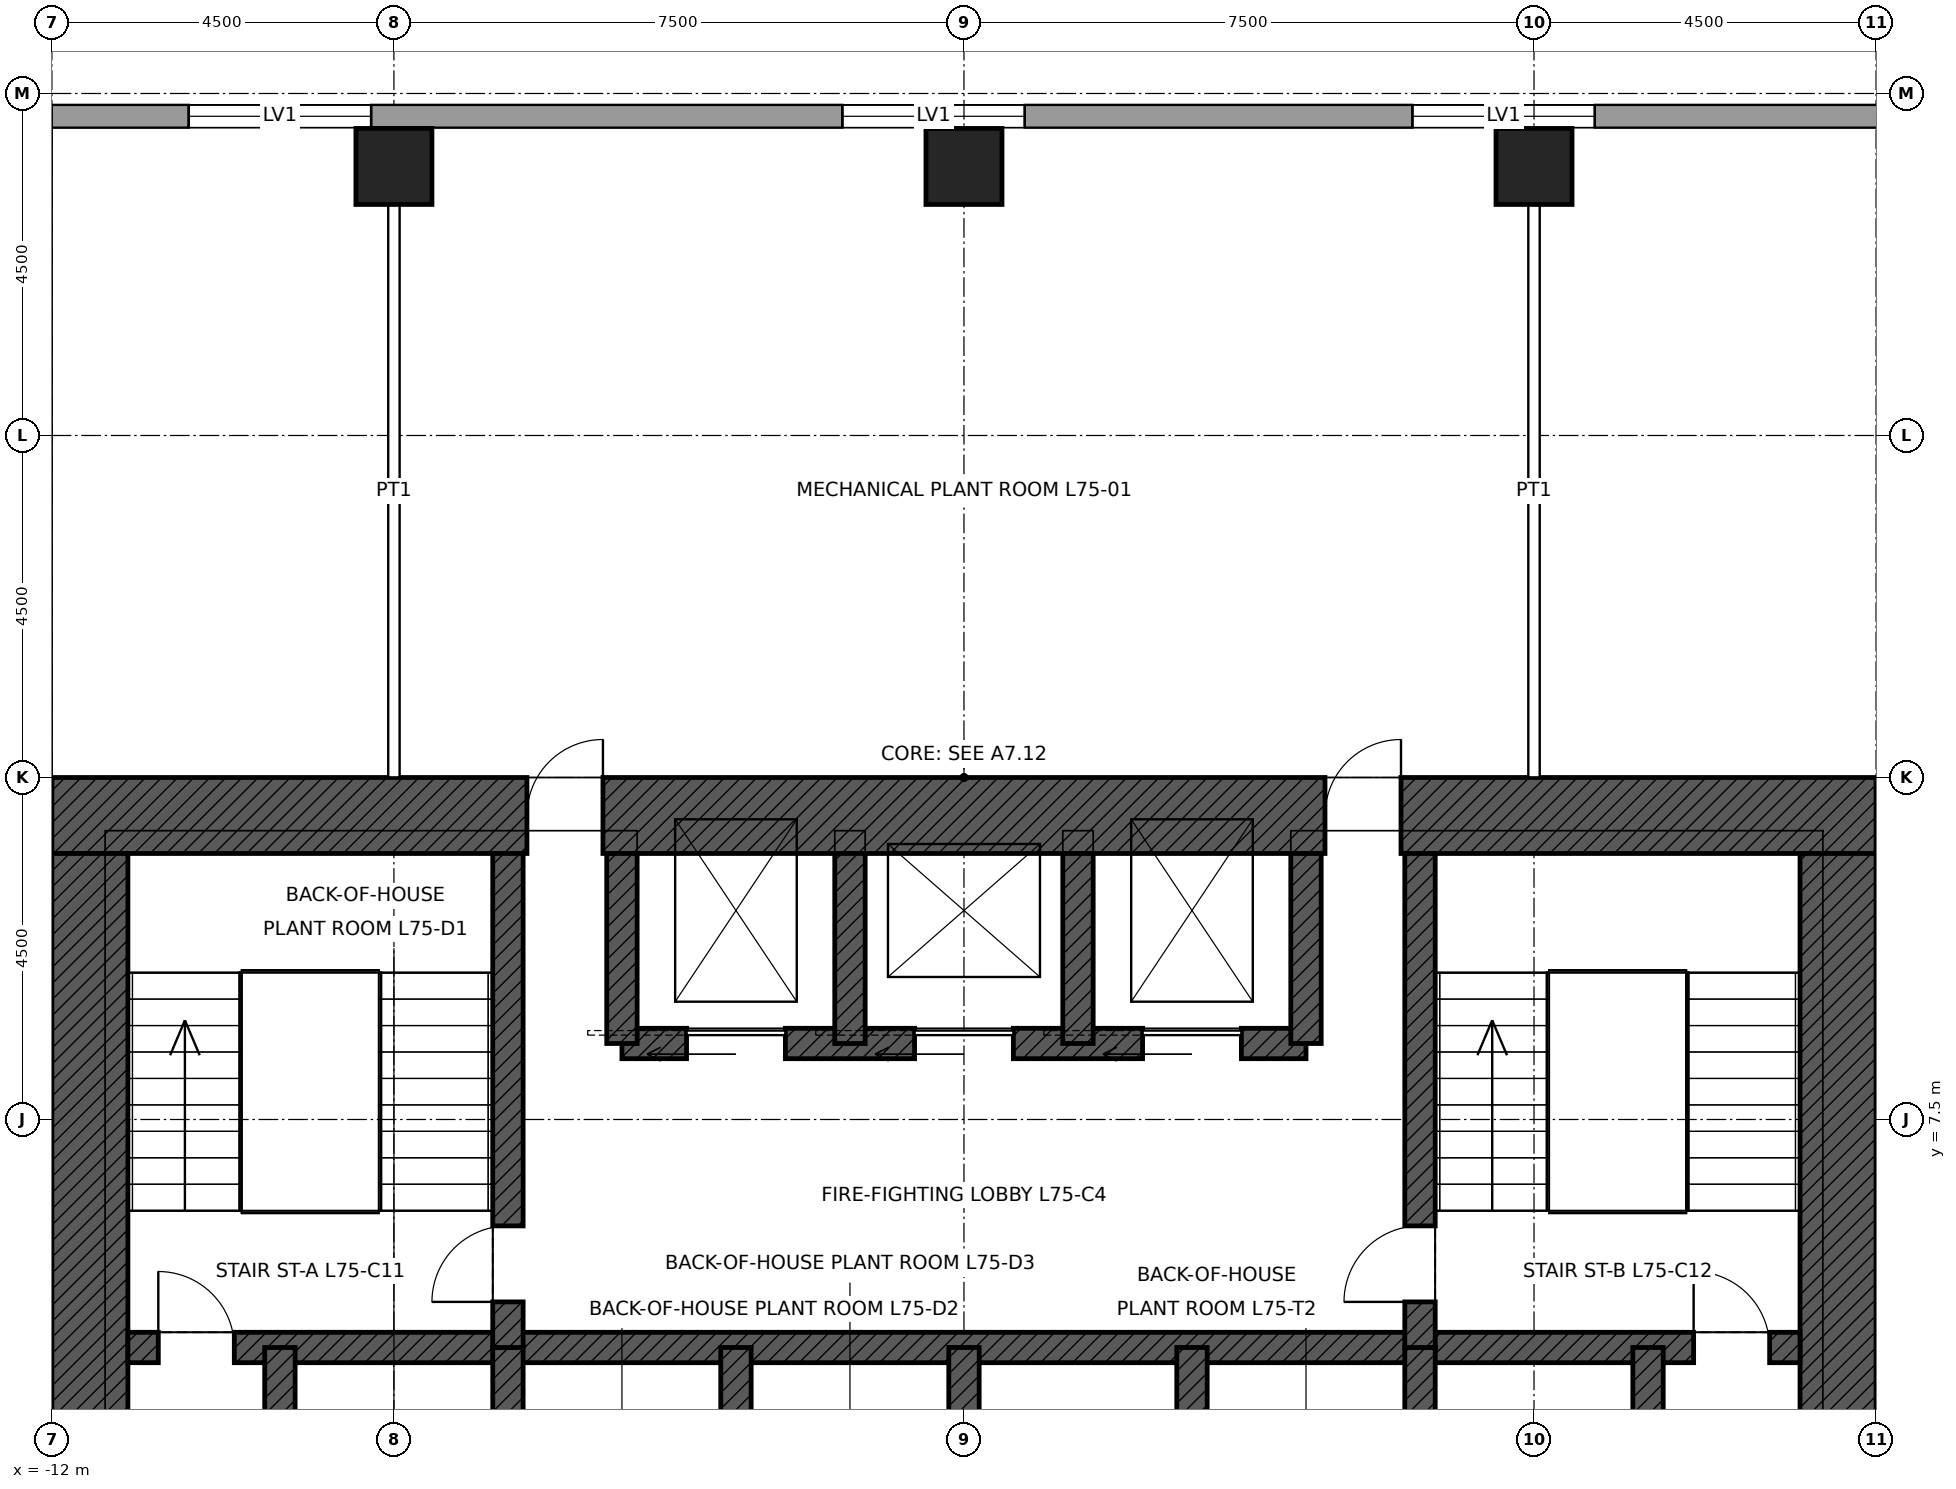
"""IFC4 building model, lengths in metres.
Left out: names, types, materials, properties, quantities, classifications, styles, units other than length and angle.
Written with IfcOpenShell. Run it as: python <this file> out.ifc"""

import sys

from ifc_helpers import new_model, si_unit, direction, frame, frame_2d, origin, origin_2d, place, context, subcontext, project, spatial, rectangle, hollow_rectangle, extrude, element, fill, save


model = new_model("IFC4")
c1 = context("Model", 3, precision=1e-05, world=origin(), true_north=direction((0.0, 1.0)))
c2 = subcontext(c1, "Body", "Model", "MODEL_VIEW")
j1 = project(units=[si_unit("LENGTHUNIT", "METRE"), si_unit("PLANEANGLEUNIT", "RADIAN")], contexts=[c1])
p1 = place(None, origin())
s1 = spatial("IfcSite", under=j1, at=p1, CompositionType="ELEMENT")
p2 = place(p1, origin())
s2 = spatial("IfcBuilding", under=s1, at=p2, CompositionType="ELEMENT")
p3 = place(p2, frame((0.0, 0.0, 335.9)))
s3 = spatial("IfcBuildingStorey", under=s2, at=p3, CompositionType="ELEMENT", Elevation=335.9)
for number, where, z_axis, x_axis in (
    (1, (-7.5, 20.04, 0.0), (0.0, 0.0, 1.0), (1.0, 0.0, 0.0)),
    (2, (0.0, 20.04, 0.0), (0.0, 0.0, 1.0), (1.0, 0.0, 0.0)),
    (3, (7.5, 20.04, 0.0), (0.0, 0.0, 1.0), (1.0, 0.0, 0.0)),
):
    element("IfcColumn", number, at=place(p3, frame(where, z_axis=z_axis, x_axis=x_axis)), inside=s3, PredefinedType="COLUMN", context=c2, shape_type="SweptSolid", body=[
        extrude(hollow_rectangle(XDim=1.0, YDim=1.0, WallThickness=0.075, at=origin_2d()), origin(), (0.0, 0.0, 1.0), 6.0),
    ])
p4 = place(p3, frame((-12.0, 11.5, 0.0), z_axis=(0.0, 0.0, 1.0), x_axis=(1.0, 0.0, 0.0)))
e4 = element("IfcWall", 4, at=p4, inside=s3, PredefinedType="SHEAR", context=c2, shape_type="SweptSolid", body=[
    extrude(rectangle(XDim=24.0, YDim=1.0, at=frame_2d((12.0, 0.0))), origin(), (0.0, 0.0, 1.0), 6.0),
])
p5 = place(p4, frame((6.25, 0.0, 0.0)))
e5 = element("IfcOpeningElement", 5, at=p5, cuts=e4, PredefinedType="OPENING", context=c2, shape_type="SweptSolid", body=[
    extrude(rectangle(XDim=1.0, YDim=2.4, at=frame_2d((0.5, 1.2))), frame((0.0, 0.51, 0.0), z_axis=(0.0, -1.0, 0.0), x_axis=(1.0, 0.0, 0.0)), (0.0, 0.0, 1.0), 1.02),
])
p6 = place(p4, frame((16.75, 0.0, 0.0)))
e6 = element("IfcOpeningElement", 6, at=p6, cuts=e4, PredefinedType="OPENING", context=c2, shape_type="SweptSolid", body=[
    extrude(rectangle(XDim=1.0, YDim=2.4, at=frame_2d((0.5, 1.2))), frame((0.0, 0.51, 0.0), z_axis=(0.0, -1.0, 0.0), x_axis=(1.0, 0.0, 0.0)), (0.0, 0.0, 1.0), 1.02),
])
p7 = place(p3, frame((11.5, 11.0, 0.0), z_axis=(0.0, 0.0, 1.0), x_axis=(0.0, -1.0, 0.0)))
e7 = element("IfcWall", 7, at=p7, inside=s3, PredefinedType="SHEAR", context=c2, shape_type="SweptSolid", body=[
    extrude(rectangle(XDim=22.0, YDim=1.0, at=frame_2d((11.0, 0.0))), origin(), (0.0, 0.0, 1.0), 6.0),
])
p8 = place(p7, frame((10.5, 0.0, 0.0)))
e8 = element("IfcOpeningElement", 8, at=p8, cuts=e7, PredefinedType="OPENING", context=c2, shape_type="SweptSolid", body=[
    extrude(rectangle(XDim=1.0, YDim=2.4, at=frame_2d((0.5, 1.2))), frame((0.0, 0.51, 0.0), z_axis=(0.0, -1.0, 0.0), x_axis=(1.0, 0.0, 0.0)), (0.0, 0.0, 1.0), 1.02),
])
p9 = place(p3, frame((-11.5, -11.0, 0.0), z_axis=(0.0, 0.0, 1.0), x_axis=(0.0, 1.0, 0.0)))
e9 = element("IfcWall", 9, at=p9, inside=s3, PredefinedType="SHEAR", context=c2, shape_type="SweptSolid", body=[
    extrude(rectangle(XDim=22.0, YDim=1.0, at=frame_2d((11.0, 0.0))), origin(), (0.0, 0.0, 1.0), 6.0),
])
p10 = place(p9, frame((10.5, 0.0, 0.0)))
e10 = element("IfcOpeningElement", 10, at=p10, cuts=e9, PredefinedType="OPENING", context=c2, shape_type="SweptSolid", body=[
    extrude(rectangle(XDim=1.0, YDim=2.4, at=frame_2d((0.5, 1.2))), frame((0.0, 0.51, 0.0), z_axis=(0.0, -1.0, 0.0), x_axis=(1.0, 0.0, 0.0)), (0.0, 0.0, 1.0), 1.02),
])
p11 = place(p3, frame((-11.0, 4.5, 0.0), z_axis=(0.0, 0.0, 1.0), x_axis=(1.0, 0.0, 0.0)))
e11 = element("IfcWall", 11, at=p11, inside=s3, PredefinedType="SHEAR", context=c2, shape_type="SweptSolid", body=[
    extrude(rectangle(XDim=22.0, YDim=0.4, at=frame_2d((11.0, 0.0))), origin(), (0.0, 0.0, 1.0), 6.0),
])
p12 = place(p11, frame((0.4, 0.0, 0.0)))
e12 = element("IfcOpeningElement", 12, at=p12, cuts=e11, PredefinedType="OPENING", context=c2, shape_type="SweptSolid", body=[
    extrude(rectangle(XDim=1.0, YDim=2.1, at=frame_2d((0.5, 1.05))), frame((0.0, 0.21, 0.0), z_axis=(0.0, -1.0, 0.0), x_axis=(1.0, 0.0, 0.0)), (0.0, 0.0, 1.0), 0.42),
])
p13 = place(p11, frame((20.6, 0.0, 0.0)))
e13 = element("IfcOpeningElement", 13, at=p13, cuts=e11, PredefinedType="OPENING", context=c2, shape_type="SweptSolid", body=[
    extrude(rectangle(XDim=1.0, YDim=2.1, at=frame_2d((0.5, 1.05))), frame((0.0, 0.21, 0.0), z_axis=(0.0, -1.0, 0.0), x_axis=(1.0, 0.0, 0.0)), (0.0, 0.0, 1.0), 0.42),
])
p14 = place(p3, frame((-4.5, 8.5, 0.0), z_axis=(0.0, 0.0, 1.0), x_axis=(1.0, 0.0, 0.0)))
e14 = element("IfcWall", 14, at=p14, inside=s3, PredefinedType="SHEAR", context=c2, shape_type="SweptSolid", body=[
    extrude(rectangle(XDim=9.0, YDim=0.4, at=frame_2d((4.5, 0.0))), origin(), (0.0, 0.0, 1.0), 6.0),
])
p15 = place(p14, frame((0.85, 0.0, 0.0)))
e15 = element("IfcOpeningElement", 15, at=p15, cuts=e14, PredefinedType="OPENING", context=c2, shape_type="SweptSolid", body=[
    extrude(rectangle(XDim=1.3, YDim=2.4, at=frame_2d((0.65, 1.2))), frame((0.0, 0.21, 0.0), z_axis=(0.0, -1.0, 0.0), x_axis=(1.0, 0.0, 0.0)), (0.0, 0.0, 1.0), 0.42),
])
p16 = place(p14, frame((6.85, 0.0, 0.0)))
e16 = element("IfcOpeningElement", 16, at=p16, cuts=e14, PredefinedType="OPENING", context=c2, shape_type="SweptSolid", body=[
    extrude(rectangle(XDim=1.3, YDim=2.4, at=frame_2d((0.65, 1.2))), frame((0.0, 0.21, 0.0), z_axis=(0.0, -1.0, 0.0), x_axis=(1.0, 0.0, 0.0)), (0.0, 0.0, 1.0), 0.42),
])
p17 = place(p14, frame((3.85, 0.0, 0.0)))
e17 = element("IfcOpeningElement", 17, at=p17, cuts=e14, PredefinedType="OPENING", context=c2, shape_type="SweptSolid", body=[
    extrude(rectangle(XDim=1.3, YDim=2.4, at=frame_2d((0.65, 1.2))), frame((0.0, 0.21, 0.0), z_axis=(0.0, -1.0, 0.0), x_axis=(1.0, 0.0, 0.0)), (0.0, 0.0, 1.0), 0.42),
])
for number, where, z_axis, x_axis in (
    (18, (-9.0, 1.5, 0.0), (0.0, 0.0, 1.0), (0.0, 1.0, 0.0)),
    (19, (9.0, 1.5, 0.0), (0.0, 0.0, 1.0), (0.0, 1.0, 0.0)),
    (20, (-6.0, 1.5, 0.0), (0.0, 0.0, 1.0), (0.0, 1.0, 0.0)),
    (21, (-3.0, 1.5, 0.0), (0.0, 0.0, 1.0), (0.0, 1.0, 0.0)),
    (22, (0.0, 1.5, 0.0), (0.0, 0.0, 1.0), (0.0, 1.0, 0.0)),
    (23, (3.0, 1.5, 0.0), (0.0, 0.0, 1.0), (0.0, 1.0, 0.0)),
    (24, (6.0, 1.5, 0.0), (0.0, 0.0, 1.0), (0.0, 1.0, 0.0)),
):
    element("IfcWall", number, at=place(p3, frame(where, z_axis=z_axis, x_axis=x_axis)), inside=s3, PredefinedType="SHEAR", context=c2, shape_type="SweptSolid", body=[
        extrude(rectangle(XDim=3.0, YDim=0.4, at=frame_2d((1.5, 0.0))), origin(), (0.0, 0.0, 1.0), 6.0),
    ])
p18 = place(p3, frame((-6.0, 4.5, 0.0), z_axis=(0.0, 0.0, 1.0), x_axis=(0.0, 1.0, 0.0)))
e25 = element("IfcWall", 25, at=p18, inside=s3, PredefinedType="SHEAR", context=c2, shape_type="SweptSolid", body=[
    extrude(rectangle(XDim=6.5, YDim=0.4, at=frame_2d((3.25, 0.0))), origin(), (0.0, 0.0, 1.0), 6.0),
])
p19 = place(p18, frame((0.6, 0.0, 0.0)))
e26 = element("IfcOpeningElement", 26, at=p19, cuts=e25, PredefinedType="OPENING", context=c2, shape_type="SweptSolid", body=[
    extrude(rectangle(XDim=1.0, YDim=2.1, at=frame_2d((0.5, 1.05))), frame((0.0, 0.21, 0.0), z_axis=(0.0, -1.0, 0.0), x_axis=(1.0, 0.0, 0.0)), (0.0, 0.0, 1.0), 0.42),
])
p20 = place(p3, frame((6.0, 4.5, 0.0), z_axis=(0.0, 0.0, 1.0), x_axis=(0.0, 1.0, 0.0)))
e27 = element("IfcWall", 27, at=p20, inside=s3, PredefinedType="SHEAR", context=c2, shape_type="SweptSolid", body=[
    extrude(rectangle(XDim=6.5, YDim=0.4, at=frame_2d((3.25, 0.0))), origin(), (0.0, 0.0, 1.0), 6.0),
])
p21 = place(p20, frame((0.6, 0.0, 0.0)))
e28 = element("IfcOpeningElement", 28, at=p21, cuts=e27, PredefinedType="OPENING", context=c2, shape_type="SweptSolid", body=[
    extrude(rectangle(XDim=1.0, YDim=2.1, at=frame_2d((0.5, 1.05))), frame((0.0, 0.21, 0.0), z_axis=(0.0, -1.0, 0.0), x_axis=(1.0, 0.0, 0.0)), (0.0, 0.0, 1.0), 0.42),
])
for number, where, z_axis, x_axis in (
    (29, (-4.5, 8.5, 0.0), (0.0, 0.0, 1.0), (0.0, 1.0, 0.0)),
    (30, (4.5, 8.5, 0.0), (0.0, 0.0, 1.0), (0.0, 1.0, 0.0)),
    (31, (-1.5, 8.5, 0.0), (0.0, 0.0, 1.0), (0.0, 1.0, 0.0)),
    (32, (1.5, 8.5, 0.0), (0.0, 0.0, 1.0), (0.0, 1.0, 0.0)),
):
    element("IfcWall", number, at=place(p3, frame(where, z_axis=z_axis, x_axis=x_axis)), inside=s3, PredefinedType="SHEAR", context=c2, shape_type="SweptSolid", body=[
        extrude(rectangle(XDim=2.5, YDim=0.4, at=frame_2d((1.25, 0.0))), origin(), (0.0, 0.0, 1.0), 6.0),
    ])
p22 = place(p3, frame((-13.2, 20.7, 0.0), z_axis=(0.0, 0.0, 1.0), x_axis=(1.0, 0.0, 0.0)))
e33 = element("IfcWall", 33, at=p22, inside=s3, PredefinedType="SOLIDWALL", context=c2, shape_type="SweptSolid", body=[
    extrude(rectangle(XDim=26.4, YDim=0.3, at=frame_2d((13.2, 0.0))), origin(), (0.0, 0.0, 1.0), 5.8),
])
p23 = place(p22, frame((3.0, 0.0, 0.6)))
e34 = element("IfcOpeningElement", 34, at=p23, cuts=e33, PredefinedType="OPENING", context=c2, shape_type="SweptSolid", body=[
    extrude(rectangle(XDim=2.4, YDim=2.4, at=frame_2d((1.2, 1.2))), frame((0.0, 0.16, 0.0), z_axis=(0.0, -1.0, 0.0), x_axis=(1.0, 0.0, 0.0)), (0.0, 0.0, 1.0), 0.32),
])
p24 = place(p22, frame((11.6, 0.0, 0.6)))
e35 = element("IfcOpeningElement", 35, at=p24, cuts=e33, PredefinedType="OPENING", context=c2, shape_type="SweptSolid", body=[
    extrude(rectangle(XDim=2.4, YDim=2.4, at=frame_2d((1.2, 1.2))), frame((0.0, 0.16, 0.0), z_axis=(0.0, -1.0, 0.0), x_axis=(1.0, 0.0, 0.0)), (0.0, 0.0, 1.0), 0.32),
])
p25 = place(p22, frame((19.1, 0.0, 0.6)))
e36 = element("IfcOpeningElement", 36, at=p25, cuts=e33, PredefinedType="OPENING", context=c2, shape_type="SweptSolid", body=[
    extrude(rectangle(XDim=2.4, YDim=2.4, at=frame_2d((1.2, 1.2))), frame((0.0, 0.16, 0.0), z_axis=(0.0, -1.0, 0.0), x_axis=(1.0, 0.0, 0.0)), (0.0, 0.0, 1.0), 0.32),
])
for number, where, z_axis, x_axis in (
    (37, (-7.5, 12.0, 0.0), (0.0, 0.0, 1.0), (0.0, 1.0, 0.0)),
    (38, (7.5, 12.0, 0.0), (0.0, 0.0, 1.0), (0.0, 1.0, 0.0)),
):
    element("IfcWall", number, at=place(p3, frame(where, z_axis=z_axis, x_axis=x_axis)), inside=s3, PredefinedType="PARTITIONING", context=c2, shape_type="SweptSolid", body=[
        extrude(rectangle(XDim=7.54, YDim=0.15, at=frame_2d((3.77, 0.0))), origin(), (0.0, 0.0, 1.0), 4.998),
    ])
p26 = place(p23, origin())
e39 = element("IfcWindow", 39, at=p26, inside=s3, PartitioningType="SINGLE_PANEL", PredefinedType="WINDOW", context=c2, shape_type="SweptSolid", body=[
    extrude(rectangle(XDim=2.4, YDim=2.4, at=frame_2d((1.2, 1.2))), frame((0.0, 0.15, 0.0), z_axis=(0.0, -1.0, 0.0), x_axis=(1.0, 0.0, 0.0)), (0.0, 0.0, 1.0), 0.06),
])
fill(e34, e39)
p27 = place(p24, origin())
e40 = element("IfcWindow", 40, at=p27, inside=s3, PartitioningType="SINGLE_PANEL", PredefinedType="WINDOW", context=c2, shape_type="SweptSolid", body=[
    extrude(rectangle(XDim=2.4, YDim=2.4, at=frame_2d((1.2, 1.2))), frame((0.0, 0.15, 0.0), z_axis=(0.0, -1.0, 0.0), x_axis=(1.0, 0.0, 0.0)), (0.0, 0.0, 1.0), 0.06),
])
fill(e35, e40)
p28 = place(p25, origin())
e41 = element("IfcWindow", 41, at=p28, inside=s3, PartitioningType="SINGLE_PANEL", PredefinedType="WINDOW", context=c2, shape_type="SweptSolid", body=[
    extrude(rectangle(XDim=2.4, YDim=2.4, at=frame_2d((1.2, 1.2))), frame((0.0, 0.15, 0.0), z_axis=(0.0, -1.0, 0.0), x_axis=(1.0, 0.0, 0.0)), (0.0, 0.0, 1.0), 0.06),
])
fill(e36, e41)
p29 = place(p12, origin())
e42 = element("IfcDoor", 42, at=p29, inside=s3, OperationType="SINGLE_SWING_LEFT", PredefinedType="DOOR", context=c2, shape_type="SweptSolid", body=[
    extrude(rectangle(XDim=1.0, YDim=2.1, at=frame_2d((0.5, 1.05))), frame((0.0, 0.025, 0.0), z_axis=(0.0, -1.0, 0.0), x_axis=(1.0, 0.0, 0.0)), (0.0, 0.0, 1.0), 0.05),
])
fill(e12, e42)
p30 = place(p13, origin())
e43 = element("IfcDoor", 43, at=p30, inside=s3, OperationType="SINGLE_SWING_LEFT", PredefinedType="DOOR", context=c2, shape_type="SweptSolid", body=[
    extrude(rectangle(XDim=1.0, YDim=2.1, at=frame_2d((0.5, 1.05))), frame((0.0, 0.025, 0.0), z_axis=(0.0, -1.0, 0.0), x_axis=(1.0, 0.0, 0.0)), (0.0, 0.0, 1.0), 0.05),
])
fill(e13, e43)
p31 = place(p19, origin())
e44 = element("IfcDoor", 44, at=p31, inside=s3, OperationType="SINGLE_SWING_LEFT", PredefinedType="DOOR", context=c2, shape_type="SweptSolid", body=[
    extrude(rectangle(XDim=1.0, YDim=2.1, at=frame_2d((0.5, 1.05))), frame((0.0, 0.025, 0.0), z_axis=(0.0, -1.0, 0.0), x_axis=(1.0, 0.0, 0.0)), (0.0, 0.0, 1.0), 0.05),
])
fill(e26, e44)
p32 = place(p21, origin())
e45 = element("IfcDoor", 45, at=p32, inside=s3, OperationType="SINGLE_SWING_LEFT", PredefinedType="DOOR", context=c2, shape_type="SweptSolid", body=[
    extrude(rectangle(XDim=1.0, YDim=2.1, at=frame_2d((0.5, 1.05))), frame((0.0, 0.025, 0.0), z_axis=(0.0, -1.0, 0.0), x_axis=(1.0, 0.0, 0.0)), (0.0, 0.0, 1.0), 0.05),
])
fill(e28, e45)
p33 = place(p5, origin())
e46 = element("IfcDoor", 46, at=p33, inside=s3, OperationType="SINGLE_SWING_RIGHT", PredefinedType="DOOR", context=c2, shape_type="SweptSolid", body=[
    extrude(rectangle(XDim=1.0, YDim=2.4, at=frame_2d((0.5, 1.2))), frame((0.0, 0.485, 0.0), z_axis=(0.0, -1.0, 0.0), x_axis=(1.0, 0.0, 0.0)), (0.0, 0.0, 1.0), 0.05),
])
fill(e5, e46)
p34 = place(p6, origin())
e47 = element("IfcDoor", 47, at=p34, inside=s3, OperationType="SINGLE_SWING_RIGHT", PredefinedType="DOOR", context=c2, shape_type="SweptSolid", body=[
    extrude(rectangle(XDim=1.0, YDim=2.4, at=frame_2d((0.5, 1.2))), frame((0.0, 0.485, 0.0), z_axis=(0.0, -1.0, 0.0), x_axis=(1.0, 0.0, 0.0)), (0.0, 0.0, 1.0), 0.05),
])
fill(e6, e47)
p35 = place(p15, origin())
e48 = element("IfcDoor", 48, at=p35, inside=s3, OperationType="SLIDING_TO_LEFT", PredefinedType="DOOR", context=c2, shape_type="SweptSolid", body=[
    extrude(rectangle(XDim=1.3, YDim=2.4, at=frame_2d((0.65, 1.2))), frame((0.0, 0.025, 0.0), z_axis=(0.0, -1.0, 0.0), x_axis=(1.0, 0.0, 0.0)), (0.0, 0.0, 1.0), 0.05),
])
fill(e15, e48)
p36 = place(p16, origin())
e49 = element("IfcDoor", 49, at=p36, inside=s3, OperationType="SLIDING_TO_LEFT", PredefinedType="DOOR", context=c2, shape_type="SweptSolid", body=[
    extrude(rectangle(XDim=1.3, YDim=2.4, at=frame_2d((0.65, 1.2))), frame((0.0, 0.025, 0.0), z_axis=(0.0, -1.0, 0.0), x_axis=(1.0, 0.0, 0.0)), (0.0, 0.0, 1.0), 0.05),
])
fill(e16, e49)
p37 = place(p17, origin())
e50 = element("IfcDoor", 50, at=p37, inside=s3, OperationType="SLIDING_TO_LEFT", PredefinedType="DOOR", context=c2, shape_type="SweptSolid", body=[
    extrude(rectangle(XDim=1.3, YDim=2.4, at=frame_2d((0.65, 1.2))), frame((0.0, 0.025, 0.0), z_axis=(0.0, -1.0, 0.0), x_axis=(1.0, 0.0, 0.0)), (0.0, 0.0, 1.0), 0.05),
])
fill(e17, e50)
save(model, sys.argv[1])
